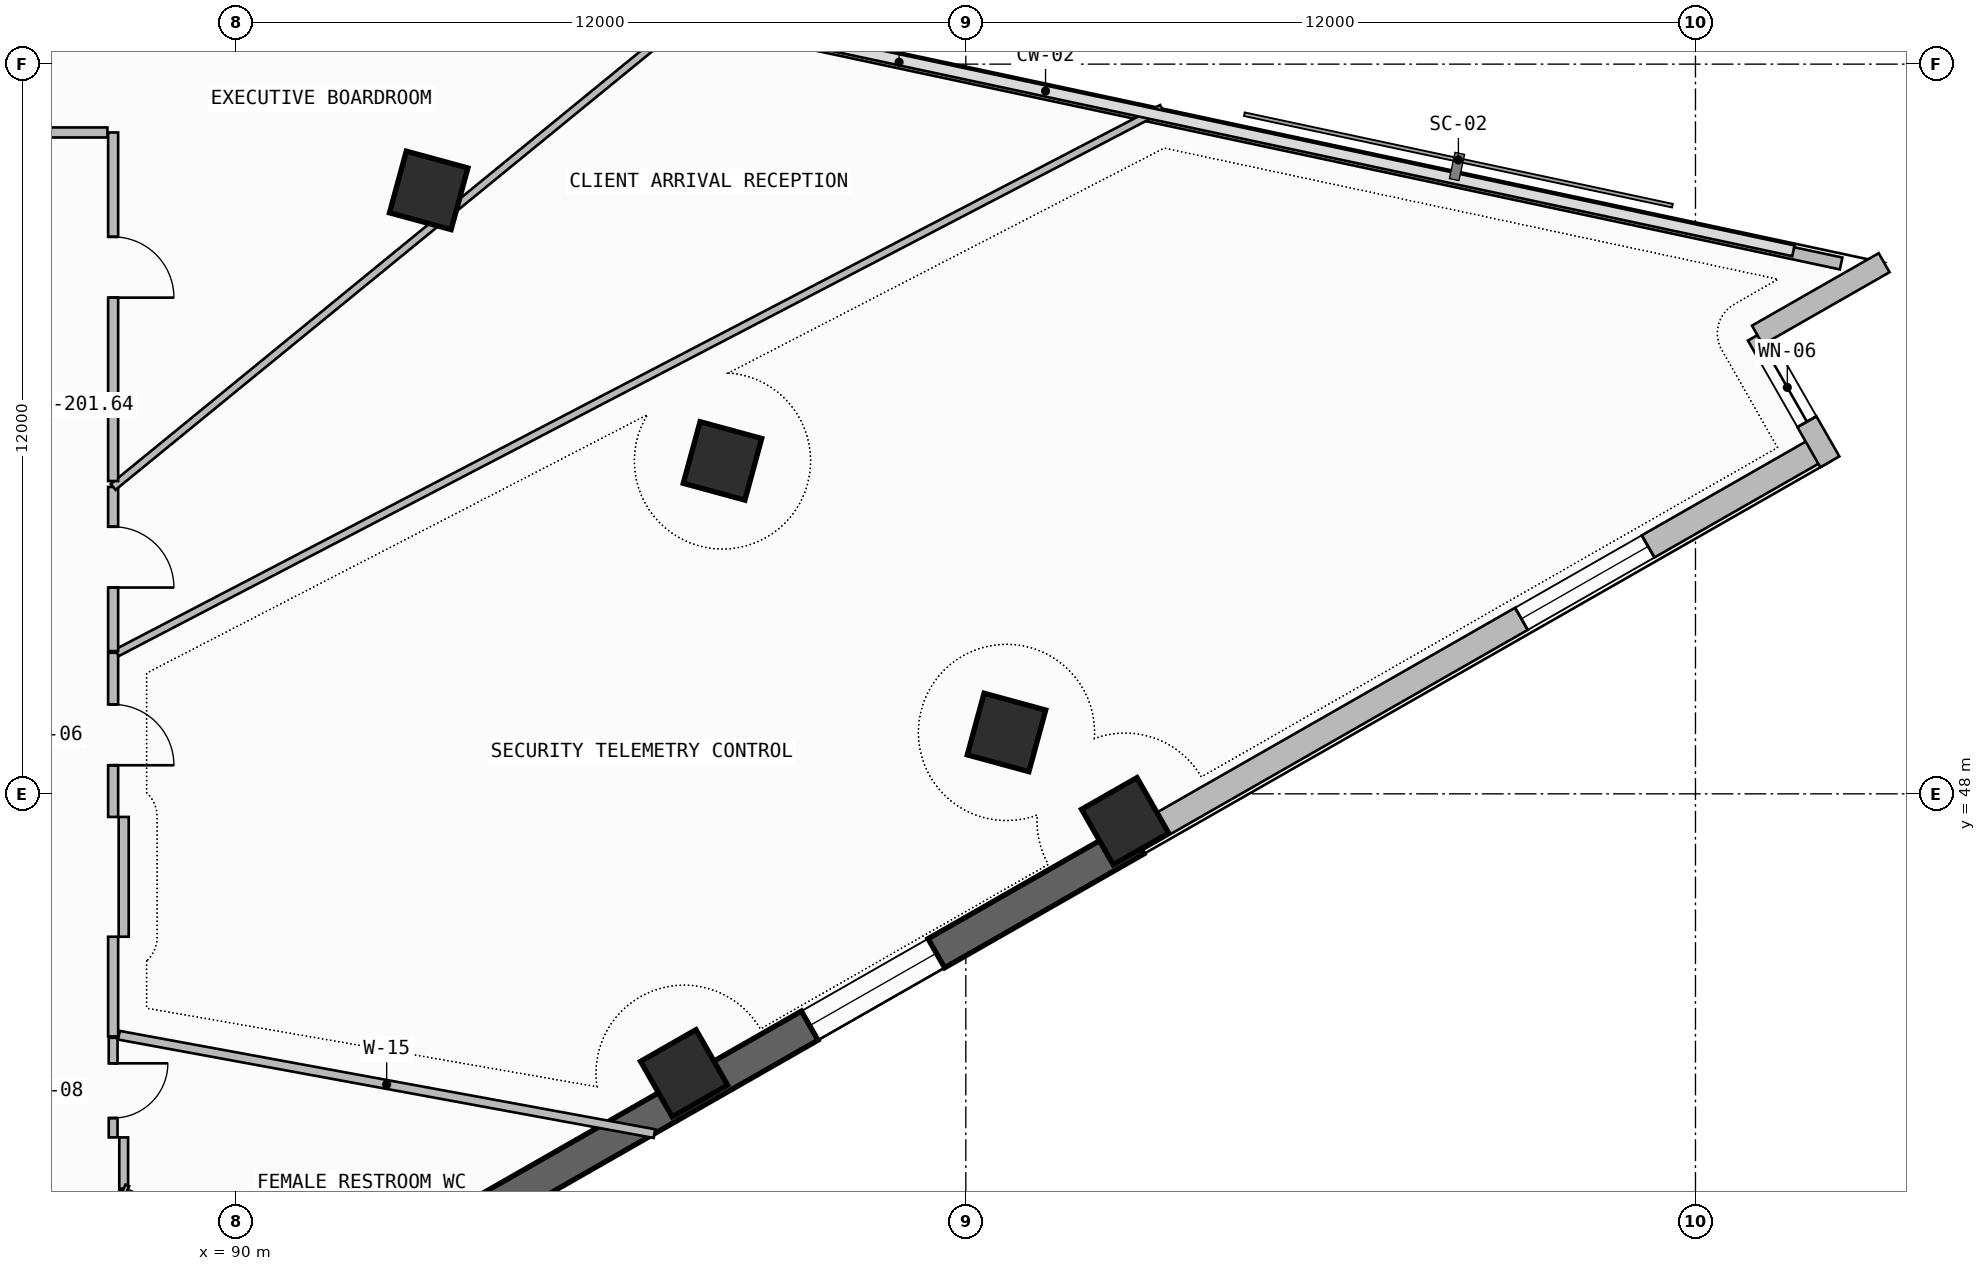
"""IFC4 building model, lengths in metres.
Left out: names, types, materials, properties, quantities, classifications, styles, units other than length and angle.
Written with IfcOpenShell. Run it as: python <this file> out.ifc"""

import sys

from ifc_helpers import new_model, si_unit, direction, frame, frame_2d, origin, origin_2d, place, context, subcontext, project, spatial, rectangle, extrude, element, fill, save


model = new_model("IFC4")
c1 = context("Model", 3, precision=1e-05, world=origin(), true_north=direction((0.0, 1.0)))
c2 = subcontext(c1, "Body", "Model", "MODEL_VIEW")
j1 = project(units=[si_unit("LENGTHUNIT", "METRE"), si_unit("PLANEANGLEUNIT", "RADIAN")], contexts=[c1])
p1 = place(None, origin())
s1 = spatial("IfcSite", under=j1, at=p1, CompositionType="ELEMENT")
p2 = place(p1, origin())
s2 = spatial("IfcBuilding", under=s1, at=p2, CompositionType="ELEMENT")
p3 = place(p2, frame((0.0, 0.0, 229.06)))
s3 = spatial("IfcBuildingStorey", under=s2, at=p3, CompositionType="ELEMENT", Elevation=229.06)
for number, where, z_axis, x_axis in (
    (1, (97.367, 43.405, 0.0), (0.0, 0.0, 1.0), (0.868, 0.496, 0.0)),
    (2, (104.62, 47.55, 0.0), (0.0, 0.0, 1.0), (0.868, 0.496, 0.0)),
    (3, (102.669, 49.01, 0.0), (0.0, 0.0, 1.0), (0.263, 0.965, 0.0)),
    (4, (97.998, 53.475, 0.0), (0.0, 0.0, 1.0), (0.263, 0.965, 0.0)),
    (5, (93.167, 57.924, 0.0), (0.0, 0.0, 1.0), (0.263, 0.965, 0.0)),
):
    element("IfcColumn", number, at=place(p3, frame(where, z_axis=z_axis, x_axis=x_axis)), inside=s3, PredefinedType="COLUMN", context=c2, shape_type="SweptSolid", body=[
        extrude(rectangle(XDim=1.05, YDim=1.05, at=origin_2d()), origin(), (0.0, 0.0, 1.0), 3.52),
    ])
p4 = place(p3, frame((89.479, 38.499, -0.26), z_axis=(0.0, 0.0, 1.0), x_axis=(0.868197136736, 0.496219439123, 0.0)))
e6 = element("IfcWall", 6, at=p4, inside=s3, PredefinedType="SHEAR", context=c2, shape_type="SweptSolid", body=[
    extrude(rectangle(XDim=17.636, YDim=0.55, at=frame_2d((8.818, 0.0))), origin(), (0.0, 0.0, 1.0), 3.52),
])
p5 = place(p4, frame((11.464, 0.0, 1.1)))
e7 = element("IfcOpeningElement", 7, at=p5, cuts=e6, PredefinedType="OPENING", context=c2, shape_type="SweptSolid", body=[
    extrude(rectangle(XDim=2.4, YDim=1.2, at=frame_2d((1.2, 0.6))), frame((0.0, 0.285, 0.0), z_axis=(0.0, -1.0, 0.0), x_axis=(1.0, 0.0, 0.0)), (0.0, 0.0, 1.0), 0.57),
])
p6 = place(p3, frame((104.791, 47.25, 0.0), z_axis=(0.0, 0.0, 1.0), x_axis=(0.868193423982, 0.496225934987, 0.0)))
e8 = element("IfcWall", 8, at=p6, inside=s3, PredefinedType="SOLIDWALL", context=c2, shape_type="SweptSolid", body=[
    extrude(rectangle(XDim=12.995, YDim=0.42, at=frame_2d((6.498, 0.0))), origin(), (0.0, 0.0, 1.0), 2.237),
])
p7 = place(p6, frame((7.31, 0.0, 0.957)))
e9 = element("IfcOpeningElement", 9, at=p7, cuts=e8, PredefinedType="OPENING", context=c2, shape_type="SweptSolid", body=[
    extrude(rectangle(XDim=2.4, YDim=1.2, at=frame_2d((1.2, 0.6))), frame((0.0, 0.22, 0.0), z_axis=(0.0, -1.0, 0.0), x_axis=(1.0, 0.0, 0.0)), (0.0, 0.0, 1.0), 0.44),
])
p8 = place(p3, frame((116.21, 53.46, 0.0), z_axis=(0.0, 0.0, 1.0), x_axis=(-0.496215637313, 0.868199309655, 0.0)))
e10 = element("IfcWall", 10, at=p8, inside=s3, PredefinedType="SOLIDWALL", context=c2, shape_type="SweptSolid", body=[
    extrude(rectangle(XDim=2.399, YDim=0.36, at=frame_2d((1.2, 0.0))), origin(), (0.0, 0.0, 1.0), 3.26),
])
p9 = place(p8, frame((0.76, 0.0, 0.45)))
e11 = element("IfcOpeningElement", 11, at=p9, cuts=e10, PredefinedType="OPENING", context=c2, shape_type="SweptSolid", body=[
    extrude(rectangle(XDim=1.3, YDim=2.4, at=frame_2d((0.65, 1.2))), frame((0.0, 0.19, 0.0), z_axis=(0.0, -1.0, 0.0), x_axis=(1.0, 0.0, 0.0)), (0.0, 0.0, 1.0), 0.38),
])
p10 = place(p3, frame((115.019, 55.543, 0.0), z_axis=(0.0, 0.0, 1.0), x_axis=(0.86818053093, 0.4962484919, 0.0)))
e12 = element("IfcWall", 12, at=p10, inside=s3, PredefinedType="SOLIDWALL", context=c2, shape_type="SweptSolid", body=[
    extrude(rectangle(XDim=2.4, YDim=0.36, at=frame_2d((1.2, 0.0))), origin(), (0.0, 0.0, 1.0), 3.26),
])
p11 = place(p3, frame((116.396, 56.722, 0.0), z_axis=(0.0, 0.0, 1.0), x_axis=(-0.977936620644, 0.208901809478, 0.0)))
e13 = element("IfcWall", 13, at=p11, inside=s3, PredefinedType="PARAPET", context=c2, shape_type="SweptSolid", body=[
    extrude(rectangle(XDim=31.685, YDim=0.2, at=frame_2d((15.843, 0.0))), origin(), (0.0, 0.0, 1.0), 1.15),
])
p12 = place(p3, frame((88.15, 39.323, 0.0), z_axis=(0.0, 0.0, 1.0), x_axis=(0.0, 1.0, 0.0)))
e14 = element("IfcWall", 14, at=p12, inside=s3, PredefinedType="PARTITIONING", context=c2, shape_type="SweptSolid", body=[
    extrude(rectangle(XDim=2.158, YDim=0.145, at=frame_2d((1.079, 0.0))), origin(), (0.0, 0.0, 1.0), 2.237),
])
p13 = place(p12, frame((0.378, 0.0, 0.0)))
e15 = element("IfcOpeningElement", 15, at=p13, cuts=e14, PredefinedType="OPENING", context=c2, shape_type="SweptSolid", body=[
    extrude(rectangle(XDim=0.95, YDim=2.15, at=frame_2d((0.475, 1.075))), frame((0.0, 0.083, 0.0), z_axis=(0.0, -1.0, 0.0), x_axis=(1.0, 0.0, 0.0)), (0.0, 0.0, 1.0), 0.165),
])
p14 = place(p3, frame((87.976, 47.62, 0.0), z_axis=(0.0, 0.0, 1.0), x_axis=(0.0, 1.0, 0.0)))
e16 = element("IfcWall", 16, at=p14, inside=s3, PredefinedType="PARTITIONING", context=c2, shape_type="SweptSolid", body=[
    extrude(rectangle(XDim=2.7, YDim=0.165, at=frame_2d((1.35, 0.0))), origin(), (0.0, 0.0, 1.0), 3.26),
])
p15 = place(p14, frame((0.85, 0.0, 0.0)))
e17 = element("IfcOpeningElement", 17, at=p15, cuts=e16, PredefinedType="OPENING", context=c2, shape_type="SweptSolid", body=[
    extrude(rectangle(XDim=1.0, YDim=2.2, at=frame_2d((0.5, 1.1))), frame((0.0, 0.093, 0.0), z_axis=(0.0, -1.0, 0.0), x_axis=(1.0, 0.0, 0.0)), (0.0, 0.0, 1.0), 0.185),
])
p16 = place(p3, frame((88.15, 45.65, 0.0), z_axis=(0.0, 0.0, 1.0), x_axis=(0.0, 1.0, 0.0)))
e18 = element("IfcWall", 18, at=p16, inside=s3, PredefinedType="PARTITIONING", context=c2, shape_type="SweptSolid", body=[
    extrude(rectangle(XDim=1.97, YDim=0.165, at=frame_2d((0.985, 0.0))), origin(), (0.0, 0.0, 1.0), 3.26),
])
p17 = place(p3, frame((87.976, 44.012, 0.0), z_axis=(0.0, 0.0, 1.0), x_axis=(0.0, 1.0, 0.0)))
e19 = element("IfcWall", 19, at=p17, inside=s3, PredefinedType="PARTITIONING", context=c2, shape_type="SweptSolid", body=[
    extrude(rectangle(XDim=1.638, YDim=0.165, at=frame_2d((0.819, 0.0))), origin(), (0.0, 0.0, 1.0), 3.26),
])
p18 = place(p3, frame((96.879, 42.412, 0.0), z_axis=(0.0, 0.0, 1.0), x_axis=(-0.983532335891, 0.18073224465, 0.0)))
e20 = element("IfcWall", 20, at=p18, inside=s3, PredefinedType="PARTITIONING", context=c2, shape_type="SweptSolid", body=[
    extrude(rectangle(XDim=8.956, YDim=0.145, at=frame_2d((4.478, 0.0))), origin(), (0.0, 0.0, 1.0), 2.237),
])
p19 = place(p3, frame((88.04, 50.32, 0.0), z_axis=(0.0, 0.0, 1.0), x_axis=(0.886887733798, 0.461985008023, 0.0)))
e21 = element("IfcWall", 21, at=p19, inside=s3, PredefinedType="PARTITIONING", context=c2, shape_type="SweptSolid", body=[
    extrude(rectangle(XDim=19.376, YDim=0.125, at=frame_2d((9.688, 0.0))), origin(), (0.0, 0.0, 1.0), 2.237),
])
p20 = place(p3, frame((87.976, 42.35, 0.0), z_axis=(0.0, 0.0, 1.0), x_axis=(0.0, 1.0, 0.0)))
e22 = element("IfcWall", 22, at=p20, inside=s3, PredefinedType="PARTITIONING", context=c2, shape_type="SweptSolid", body=[
    extrude(rectangle(XDim=1.638, YDim=0.145, at=frame_2d((0.819, 0.0))), origin(), (0.0, 0.0, 1.0), 2.237),
])
p21 = place(p20, frame((0.318, 0.0, 0.0)))
e23 = element("IfcOpeningElement", 23, at=p21, cuts=e22, PredefinedType="OPENING", context=c2, shape_type="SweptSolid", body=[
    extrude(rectangle(XDim=0.9, YDim=2.1, at=frame_2d((0.45, 1.05))), frame((0.0, 0.083, 0.0), z_axis=(0.0, -1.0, 0.0), x_axis=(1.0, 0.0, 0.0)), (0.0, 0.0, 1.0), 0.165),
])
p22 = place(p3, frame((88.15, 41.507, 0.0), z_axis=(0.0, 0.0, 1.0), x_axis=(0.0, 1.0, 0.0)))
e24 = element("IfcWall", 24, at=p22, inside=s3, PredefinedType="PARTITIONING", context=c2, shape_type="SweptSolid", body=[
    extrude(rectangle(XDim=0.843, YDim=0.145, at=frame_2d((0.421, 0.0))), origin(), (0.0, 0.0, 1.0), 2.237),
])
p23 = place(p3, frame((88.21, 41.481, 0.0), z_axis=(0.0, 0.0, 1.0), x_axis=(-0.91641468621, 0.400230087447, 0.0)))
e25 = element("IfcWall", 25, at=p23, inside=s3, PredefinedType="PARTITIONING", context=c2, shape_type="SweptSolid", body=[
    extrude(rectangle(XDim=0.065, YDim=0.145, at=frame_2d((0.033, 0.0))), origin(), (0.0, 0.0, 1.0), 2.237),
])
p24 = place(p3, frame((87.976, 50.347, 0.0), z_axis=(0.0, 0.0, 1.0), x_axis=(0.0, 1.0, 0.0)))
e26 = element("IfcWall", 26, at=p24, inside=s3, PredefinedType="PARTITIONING", context=c2, shape_type="SweptSolid", body=[
    extrude(rectangle(XDim=2.7, YDim=0.165, at=frame_2d((1.35, 0.0))), origin(), (0.0, 0.0, 1.0), 3.26),
])
p25 = place(p24, frame((1.045, 0.0, 0.0)))
e27 = element("IfcOpeningElement", 27, at=p25, cuts=e26, PredefinedType="OPENING", context=c2, shape_type="SweptSolid", body=[
    extrude(rectangle(XDim=1.0, YDim=2.2, at=frame_2d((0.5, 1.1))), frame((0.0, 0.093, 0.0), z_axis=(0.0, -1.0, 0.0), x_axis=(1.0, 0.0, 0.0)), (0.0, 0.0, 1.0), 0.185),
])
p26 = place(p3, frame((87.976, 53.048, 0.0), z_axis=(0.0, 0.0, 1.0), x_axis=(0.774410079036, 0.632683988645, 0.0)))
e28 = element("IfcWall", 28, at=p26, inside=s3, PredefinedType="PARTITIONING", context=c2, shape_type="SweptSolid", body=[
    extrude(rectangle(XDim=12.415, YDim=0.125, at=frame_2d((6.208, 0.0))), origin(), (0.0, 0.0, 1.0), 2.237),
])
p27 = place(p3, frame((87.976, 53.144, 0.0), z_axis=(0.0, 0.0, 1.0), x_axis=(0.0, 1.0, 0.0)))
e29 = element("IfcWall", 29, at=p27, inside=s3, PredefinedType="PARTITIONING", context=c2, shape_type="SweptSolid", body=[
    extrude(rectangle(XDim=5.733, YDim=0.165, at=frame_2d((2.866, 0.0))), origin(), (0.0, 0.0, 1.0), 2.237),
])
p28 = place(p27, frame((3.016, 0.0, 0.0)))
e30 = element("IfcOpeningElement", 30, at=p28, cuts=e29, PredefinedType="OPENING", context=c2, shape_type="SweptSolid", body=[
    extrude(rectangle(XDim=1.0, YDim=2.2, at=frame_2d((0.5, 1.1))), frame((0.0, 0.093, 0.0), z_axis=(0.0, -1.0, 0.0), x_axis=(1.0, 0.0, 0.0)), (0.0, 0.0, 1.0), 0.185),
])
p29 = place(p3, frame((87.882, 58.876, 0.0), z_axis=(0.0, 0.0, 1.0), x_axis=(-1.0, 0.0, 0.0)))
e31 = element("IfcWall", 31, at=p29, inside=s3, PredefinedType="PARTITIONING", context=c2, shape_type="SweptSolid", body=[
    extrude(rectangle(XDim=3.136, YDim=0.165, at=frame_2d((1.568, 0.0))), origin(), (0.0, 0.0, 1.0), 2.237),
])
p30 = place(p5, origin())
e32 = element("IfcWindow", 32, at=p30, inside=s3, PartitioningType="SINGLE_PANEL", PredefinedType="WINDOW", context=c2, shape_type="SweptSolid", body=[
    extrude(rectangle(XDim=2.4, YDim=1.2, at=frame_2d((1.2, 0.6))), frame((0.0, 0.03, 0.0), z_axis=(0.0, -1.0, 0.0), x_axis=(1.0, 0.0, 0.0)), (0.0, 0.0, 1.0), 0.06),
])
fill(e7, e32)
p31 = place(p7, origin())
e33 = element("IfcWindow", 33, at=p31, inside=s3, PartitioningType="SINGLE_PANEL", PredefinedType="WINDOW", context=c2, shape_type="SweptSolid", body=[
    extrude(rectangle(XDim=2.4, YDim=1.2, at=frame_2d((1.2, 0.6))), frame((0.0, 0.03, 0.0), z_axis=(0.0, -1.0, 0.0), x_axis=(1.0, 0.0, 0.0)), (0.0, 0.0, 1.0), 0.06),
])
fill(e9, e33)
p32 = place(p9, origin())
e34 = element("IfcWindow", 34, at=p32, inside=s3, PartitioningType="SINGLE_PANEL", PredefinedType="WINDOW", context=c2, shape_type="SweptSolid", body=[
    extrude(rectangle(XDim=1.3, YDim=2.4, at=frame_2d((0.65, 1.2))), frame((0.0, 0.03, 0.0), z_axis=(0.0, -1.0, 0.0), x_axis=(1.0, 0.0, 0.0)), (0.0, 0.0, 1.0), 0.06),
])
fill(e11, e34)
p33 = place(p15, frame((1.0, 0.0, 0.0), z_axis=(0.0, 0.0, 1.0), x_axis=(-1.0, 0.0, 0.0)))
e35 = element("IfcDoor", 35, at=p33, inside=s3, OperationType="SINGLE_SWING_RIGHT", PredefinedType="DOOR", context=c2, shape_type="SweptSolid", body=[
    extrude(rectangle(XDim=1.0, YDim=2.2, at=frame_2d((0.5, 1.1))), frame((0.0, 0.025, 0.0), z_axis=(0.0, -1.0, 0.0), x_axis=(1.0, 0.0, 0.0)), (0.0, 0.0, 1.0), 0.05),
])
fill(e17, e35)
p34 = place(p21, frame((0.9, 0.0, 0.0), z_axis=(0.0, 0.0, 1.0), x_axis=(-1.0, 0.0, 0.0)))
e36 = element("IfcDoor", 36, at=p34, inside=s3, OperationType="SINGLE_SWING_LEFT", PredefinedType="DOOR", context=c2, shape_type="SweptSolid", body=[
    extrude(rectangle(XDim=0.9, YDim=2.1, at=frame_2d((0.45, 1.05))), frame((0.0, 0.025, 0.0), z_axis=(0.0, -1.0, 0.0), x_axis=(1.0, 0.0, 0.0)), (0.0, 0.0, 1.0), 0.05),
])
fill(e23, e36)
p35 = place(p25, frame((1.0, 0.0, 0.0), z_axis=(0.0, 0.0, 1.0), x_axis=(-1.0, 0.0, 0.0)))
e37 = element("IfcDoor", 37, at=p35, inside=s3, OperationType="SINGLE_SWING_RIGHT", PredefinedType="DOOR", context=c2, shape_type="SweptSolid", body=[
    extrude(rectangle(XDim=1.0, YDim=2.2, at=frame_2d((0.5, 1.1))), frame((0.0, 0.025, 0.0), z_axis=(0.0, -1.0, 0.0), x_axis=(1.0, 0.0, 0.0)), (0.0, 0.0, 1.0), 0.05),
])
fill(e27, e37)
p36 = place(p28, frame((1.0, 0.0, 0.0), z_axis=(0.0, 0.0, 1.0), x_axis=(-1.0, 0.0, 0.0)))
e38 = element("IfcDoor", 38, at=p36, inside=s3, OperationType="SINGLE_SWING_RIGHT", PredefinedType="DOOR", context=c2, shape_type="SweptSolid", body=[
    extrude(rectangle(XDim=1.0, YDim=2.2, at=frame_2d((0.5, 1.1))), frame((0.0, 0.025, 0.0), z_axis=(0.0, -1.0, 0.0), x_axis=(1.0, 0.0, 0.0)), (0.0, 0.0, 1.0), 0.05),
])
fill(e30, e38)
save(model, sys.argv[1])
